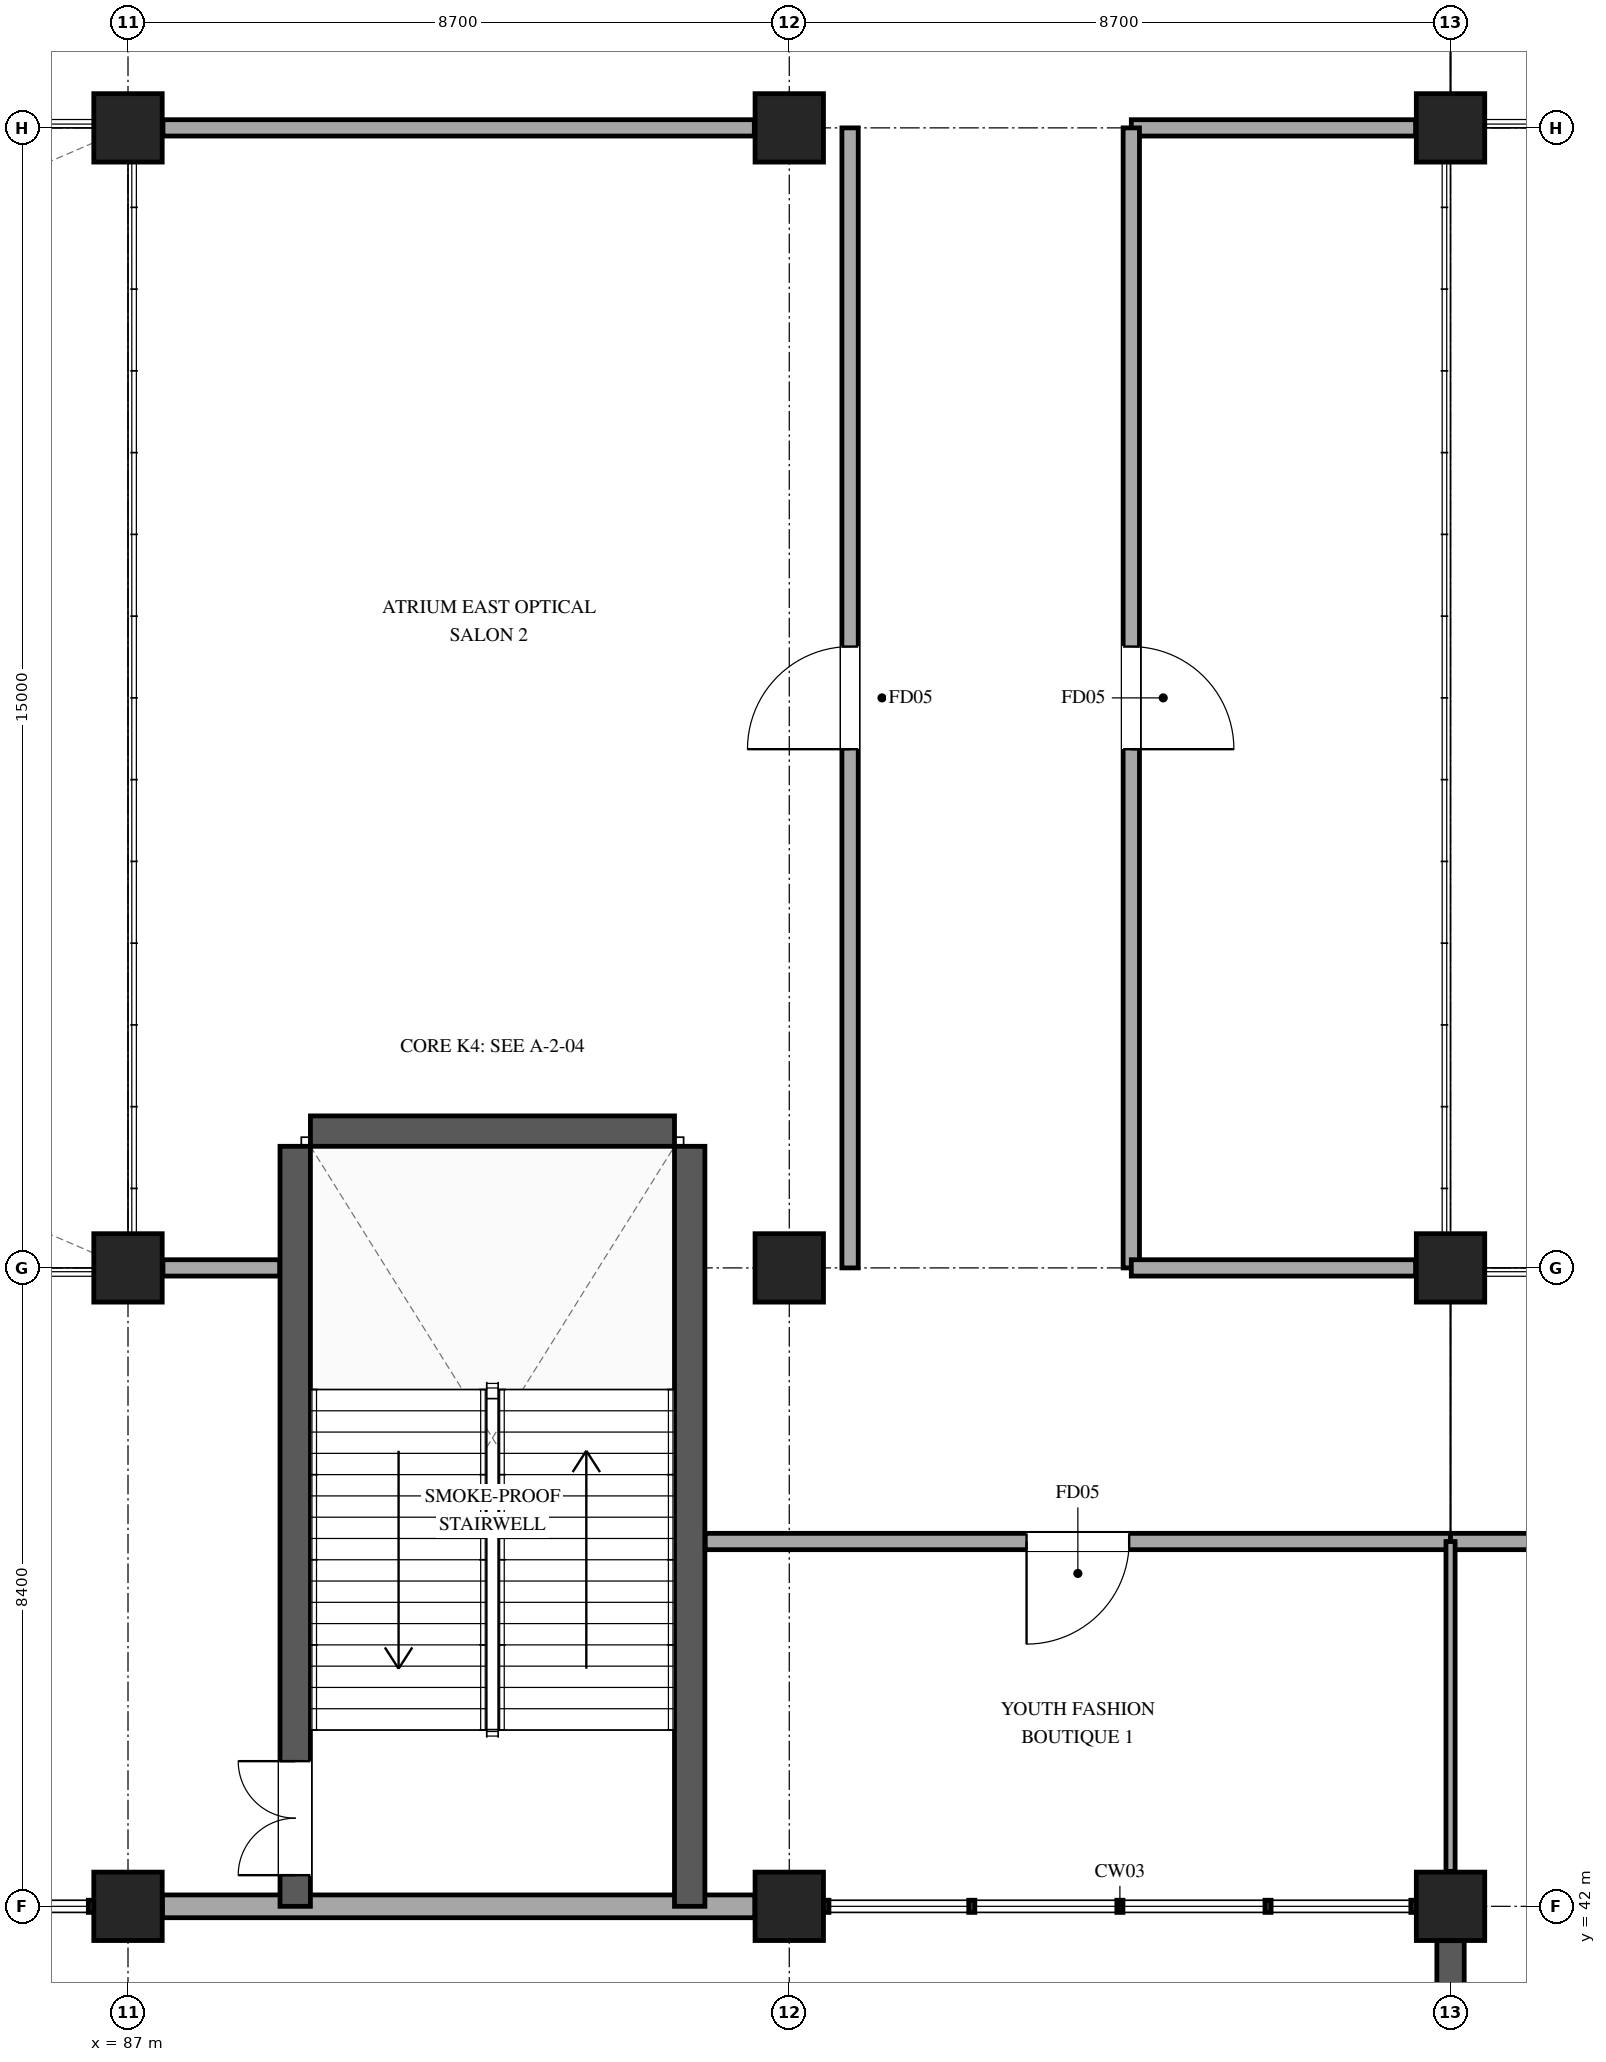
"""IFC4 building model, lengths in metres.
Left out: names, types, materials, properties, quantities, classifications, styles, units other than length and angle.
Written with IfcOpenShell. Run it as: python <this file> out.ifc"""

import sys

from ifc_helpers import new_model, si_unit, direction, frame, frame_2d, origin, origin_2d, place, context, subcontext, project, spatial, rectangle, extrude, element, fill, save


model = new_model("IFC4")
c1 = context("Model", 3, precision=1e-05, world=origin(), true_north=direction((0.0, 1.0)))
c2 = subcontext(c1, "Body", "Model", "MODEL_VIEW")
j1 = project(units=[si_unit("LENGTHUNIT", "METRE"), si_unit("PLANEANGLEUNIT", "RADIAN")], contexts=[c1])
p1 = place(None, origin())
s1 = spatial("IfcSite", under=j1, at=p1, CompositionType="ELEMENT")
p2 = place(p1, origin())
s2 = spatial("IfcBuilding", under=s1, at=p2, CompositionType="ELEMENT")
p3 = place(p2, frame((0.0, 0.0, 11.4)))
s3 = spatial("IfcBuildingStorey", under=s2, at=p3, CompositionType="ELEMENT", Elevation=11.4)
for number, where, z_axis, x_axis in (
    (1, (87.0, 42.0, 0.0), (0.0, 0.0, 1.0), (1.0, 0.0, 0.0)),
    (2, (87.0, 50.4, 0.0), (0.0, 0.0, 1.0), (1.0, 0.0, 0.0)),
    (3, (87.0, 65.4, 0.0), (0.0, 0.0, 1.0), (1.0, 0.0, 0.0)),
    (4, (95.7, 42.0, 0.0), (0.0, 0.0, 1.0), (1.0, 0.0, 0.0)),
    (5, (95.7, 50.4, 0.0), (0.0, 0.0, 1.0), (1.0, 0.0, 0.0)),
    (6, (95.7, 65.4, 0.0), (0.0, 0.0, 1.0), (1.0, 0.0, 0.0)),
    (7, (104.4, 42.0, 0.0), (0.0, 0.0, 1.0), (1.0, 0.0, 0.0)),
    (8, (104.4, 50.4, 0.0), (0.0, 0.0, 1.0), (1.0, 0.0, 0.0)),
    (9, (104.4, 65.4, 0.0), (0.0, 0.0, 1.0), (1.0, 0.0, 0.0)),
):
    element("IfcColumn", number, at=place(p3, frame(where, z_axis=z_axis, x_axis=x_axis)), inside=s3, PredefinedType="COLUMN", context=c2, shape_type="SweptSolid", body=[
        extrude(rectangle(XDim=0.9, YDim=0.9, at=origin_2d()), origin(), (0.0, 0.0, 1.0), 5.1),
    ])
p4 = place(p3, frame((104.4, 34.052, 0.0), z_axis=(0.0, 0.0, 1.0), x_axis=(0.0, 1.0, 0.0)))
e10 = element("IfcWall", 10, at=p4, inside=s3, PredefinedType="STANDARD", context=c2, shape_type="SweptSolid", body=[
    extrude(rectangle(XDim=7.496, YDim=0.36, at=frame_2d((3.748, 0.0))), origin(), (0.0, 0.0, 1.0), 4.79),
])
p5 = place(p4, frame((2.548, 0.0, 0.85)))
e11 = element("IfcOpeningElement", 11, at=p5, cuts=e10, PredefinedType="OPENING", context=c2, shape_type="SweptSolid", body=[
    extrude(rectangle(XDim=2.4, YDim=2.05, at=frame_2d((1.2, 1.025))), frame((0.0, 0.19, 0.0), z_axis=(0.0, -1.0, 0.0), x_axis=(1.0, 0.0, 0.0)), (0.0, 0.0, 1.0), 0.38),
])
p6 = place(p3, frame((95.248, 42.0, 0.0), z_axis=(0.0, 0.0, 1.0), x_axis=(-1.0, 0.0, 0.0)))
e12 = element("IfcWall", 12, at=p6, inside=s3, PredefinedType="STANDARD", context=c2, shape_type="SweptSolid", body=[
    extrude(rectangle(XDim=7.796, YDim=0.3, at=frame_2d((3.898, 0.0))), origin(), (0.0, 0.0, 1.0), 4.79),
])
p7 = place(p3, frame((89.2, 42.0, 0.0), z_axis=(0.0, 0.0, 1.0), x_axis=(0.0, 1.0, 0.0)))
e13 = element("IfcWall", 13, at=p7, inside=s3, PredefinedType="SHEAR", context=c2, shape_type="SweptSolid", body=[
    extrude(rectangle(XDim=10.0, YDim=0.4, at=frame_2d((5.0, 0.0))), origin(), (0.0, 0.0, 1.0), 5.1),
])
p8 = place(p7, frame((0.41, 0.0, 0.0)))
e14 = element("IfcOpeningElement", 14, at=p8, cuts=e13, PredefinedType="OPENING", context=c2, shape_type="SweptSolid", body=[
    extrude(rectangle(XDim=1.5, YDim=2.2, at=frame_2d((0.75, 1.1))), frame((0.0, 0.21, 0.0), z_axis=(0.0, -1.0, 0.0), x_axis=(1.0, 0.0, 0.0)), (0.0, 0.0, 1.0), 0.42),
])
p9 = place(p3, frame((94.39, 52.0, 0.0), z_axis=(0.0, 0.0, 1.0), x_axis=(0.0, -1.0, 0.0)))
e15 = element("IfcWall", 15, at=p9, inside=s3, PredefinedType="SHEAR", context=c2, shape_type="SweptSolid", body=[
    extrude(rectangle(XDim=10.0, YDim=0.4, at=frame_2d((5.0, 0.0))), origin(), (0.0, 0.0, 1.0), 5.1),
])
p10 = place(p3, frame((89.4, 52.2, 0.0), z_axis=(0.0, 0.0, 1.0), x_axis=(1.0, 0.0, 0.0)))
e16 = element("IfcWall", 16, at=p10, inside=s3, PredefinedType="SHEAR", context=c2, shape_type="SweptSolid", body=[
    extrude(rectangle(XDim=4.79, YDim=0.4, at=frame_2d((2.395, 0.0))), origin(), (0.0, 0.0, 1.0), 5.1),
])
p11 = place(p3, frame((104.4, 46.8, 0.0), z_axis=(0.0, 0.0, 1.0), x_axis=(-1.0, 0.0, 0.0)))
e17 = element("IfcWall", 17, at=p11, inside=s3, PredefinedType="PARTITIONING", context=c2, shape_type="SweptSolid", body=[
    extrude(rectangle(XDim=9.805, YDim=0.215, at=frame_2d((4.902, 0.0))), origin(), (0.0, 0.0, 1.0), 4.06),
])
p12 = place(p11, frame((4.228, 0.0, 0.0)))
e18 = element("IfcOpeningElement", 18, at=p12, cuts=e17, PredefinedType="OPENING", context=c2, shape_type="SweptSolid", body=[
    extrude(rectangle(XDim=1.35, YDim=2.2, at=frame_2d((0.675, 1.1))), frame((0.0, 0.118, 0.0), z_axis=(0.0, -1.0, 0.0), x_axis=(1.0, 0.0, 0.0)), (0.0, 0.0, 1.0), 0.235),
])
p13 = place(p3, frame((103.94, 65.4, 0.0), z_axis=(0.0, 0.0, 1.0), x_axis=(-1.0, 0.0, 0.0)))
e19 = element("IfcWall", 19, at=p13, inside=s3, PredefinedType="PARTITIONING", context=c2, shape_type="SweptSolid", body=[
    extrude(rectangle(XDim=3.74, YDim=0.215, at=frame_2d((1.87, 0.0))), origin(), (0.0, 0.0, 1.0), 3.86),
])
p14 = place(p3, frame((100.2, 65.4, 0.0), z_axis=(0.0, 0.0, 1.0), x_axis=(0.0, -1.0, 0.0)))
e20 = element("IfcWall", 20, at=p14, inside=s3, PredefinedType="PARTITIONING", context=c2, shape_type="SweptSolid", body=[
    extrude(rectangle(XDim=15.0, YDim=0.215, at=frame_2d((7.5, 0.0))), origin(), (0.0, 0.0, 1.0), 3.86),
])
p15 = place(p14, frame((6.825, 0.0, 0.0)))
e21 = element("IfcOpeningElement", 21, at=p15, cuts=e20, PredefinedType="OPENING", context=c2, shape_type="SweptSolid", body=[
    extrude(rectangle(XDim=1.35, YDim=2.2, at=frame_2d((0.675, 1.1))), frame((0.0, 0.118, 0.0), z_axis=(0.0, -1.0, 0.0), x_axis=(1.0, 0.0, 0.0)), (0.0, 0.0, 1.0), 0.235),
])
p16 = place(p3, frame((100.2, 50.4, 0.0), z_axis=(0.0, 0.0, 1.0), x_axis=(1.0, 0.0, 0.0)))
e22 = element("IfcWall", 22, at=p16, inside=s3, PredefinedType="PARTITIONING", context=c2, shape_type="SweptSolid", body=[
    extrude(rectangle(XDim=3.74, YDim=0.215, at=frame_2d((1.87, 0.0))), origin(), (0.0, 0.0, 1.0), 3.86),
])
p17 = place(p3, frame((87.46, 50.4, 0.0), z_axis=(0.0, 0.0, 1.0), x_axis=(1.0, 0.0, 0.0)))
e23 = element("IfcWall", 23, at=p17, inside=s3, PredefinedType="PARTITIONING", context=c2, shape_type="SweptSolid", body=[
    extrude(rectangle(XDim=1.535, YDim=0.215, at=frame_2d((0.768, 0.0))), origin(), (0.0, 0.0, 1.0), 4.76),
])
p18 = place(p3, frame((96.5, 50.4, 0.0), z_axis=(0.0, 0.0, 1.0), x_axis=(0.0, 1.0, 0.0)))
e24 = element("IfcWall", 24, at=p18, inside=s3, PredefinedType="PARTITIONING", context=c2, shape_type="SweptSolid", body=[
    extrude(rectangle(XDim=15.0, YDim=0.215, at=frame_2d((7.5, 0.0))), origin(), (0.0, 0.0, 1.0), 3.86),
])
p19 = place(p18, frame((6.825, 0.0, 0.0)))
e25 = element("IfcOpeningElement", 25, at=p19, cuts=e24, PredefinedType="OPENING", context=c2, shape_type="SweptSolid", body=[
    extrude(rectangle(XDim=1.35, YDim=2.2, at=frame_2d((0.675, 1.1))), frame((0.0, 0.118, 0.0), z_axis=(0.0, -1.0, 0.0), x_axis=(1.0, 0.0, 0.0)), (0.0, 0.0, 1.0), 0.235),
])
p20 = place(p3, frame((95.24, 65.4, 0.0), z_axis=(0.0, 0.0, 1.0), x_axis=(-1.0, 0.0, 0.0)))
e26 = element("IfcWall", 26, at=p20, inside=s3, PredefinedType="PARTITIONING", context=c2, shape_type="SweptSolid", body=[
    extrude(rectangle(XDim=7.78, YDim=0.215, at=frame_2d((3.89, 0.0))), origin(), (0.0, 0.0, 1.0), 3.86),
])
p21 = place(p3, frame((114.0, 46.8, 0.0), z_axis=(0.0, 0.0, 1.0), x_axis=(-1.0, 0.0, 0.0)))
e27 = element("IfcWall", 27, at=p21, inside=s3, PredefinedType="PARTITIONING", context=c2, shape_type="SweptSolid", body=[
    extrude(rectangle(XDim=9.6, YDim=0.215, at=frame_2d((4.8, 0.0))), origin(), (0.0, 0.0, 1.0), 4.06),
])
p22 = place(p3, frame((104.4, 46.8, 0.0), z_axis=(0.0, 0.0, 1.0), x_axis=(0.0, -1.0, 0.0)))
e28 = element("IfcWall", 28, at=p22, inside=s3, PredefinedType="PARTITIONING", context=c2, shape_type="SweptSolid", body=[
    extrude(rectangle(XDim=4.34, YDim=0.12, at=frame_2d((2.17, 0.0))), origin(), (0.0, 0.0, 1.0), 4.16),
])
p23 = place(p8, origin())
e29 = element("IfcDoor", 29, at=p23, inside=s3, OperationType="DOUBLE_DOOR_SINGLE_SWING", PredefinedType="DOOR", context=c2, shape_type="SweptSolid", body=[
    extrude(rectangle(XDim=1.5, YDim=2.2, at=frame_2d((0.75, 1.1))), frame((0.0, 0.025, 0.0), z_axis=(0.0, -1.0, 0.0), x_axis=(1.0, 0.0, 0.0)), (0.0, 0.0, 1.0), 0.05),
])
fill(e14, e29)
p24 = place(p12, origin())
e30 = element("IfcDoor", 30, at=p24, inside=s3, OperationType="SINGLE_SWING_RIGHT", PredefinedType="DOOR", context=c2, shape_type="SweptSolid", body=[
    extrude(rectangle(XDim=1.35, YDim=2.2, at=frame_2d((0.675, 1.1))), frame((0.0, 0.025, 0.0), z_axis=(0.0, -1.0, 0.0), x_axis=(1.0, 0.0, 0.0)), (0.0, 0.0, 1.0), 0.05),
])
fill(e18, e30)
p25 = place(p15, origin())
e31 = element("IfcDoor", 31, at=p25, inside=s3, OperationType="SINGLE_SWING_RIGHT", PredefinedType="DOOR", context=c2, shape_type="SweptSolid", body=[
    extrude(rectangle(XDim=1.35, YDim=2.2, at=frame_2d((0.675, 1.1))), frame((0.0, 0.025, 0.0), z_axis=(0.0, -1.0, 0.0), x_axis=(1.0, 0.0, 0.0)), (0.0, 0.0, 1.0), 0.05),
])
fill(e21, e31)
p26 = place(p19, origin())
e32 = element("IfcDoor", 32, at=p26, inside=s3, OperationType="SINGLE_SWING_LEFT", PredefinedType="DOOR", context=c2, shape_type="SweptSolid", body=[
    extrude(rectangle(XDim=1.35, YDim=2.2, at=frame_2d((0.675, 1.1))), frame((0.0, 0.025, 0.0), z_axis=(0.0, -1.0, 0.0), x_axis=(1.0, 0.0, 0.0)), (0.0, 0.0, 1.0), 0.05),
])
fill(e25, e32)
save(model, sys.argv[1])
